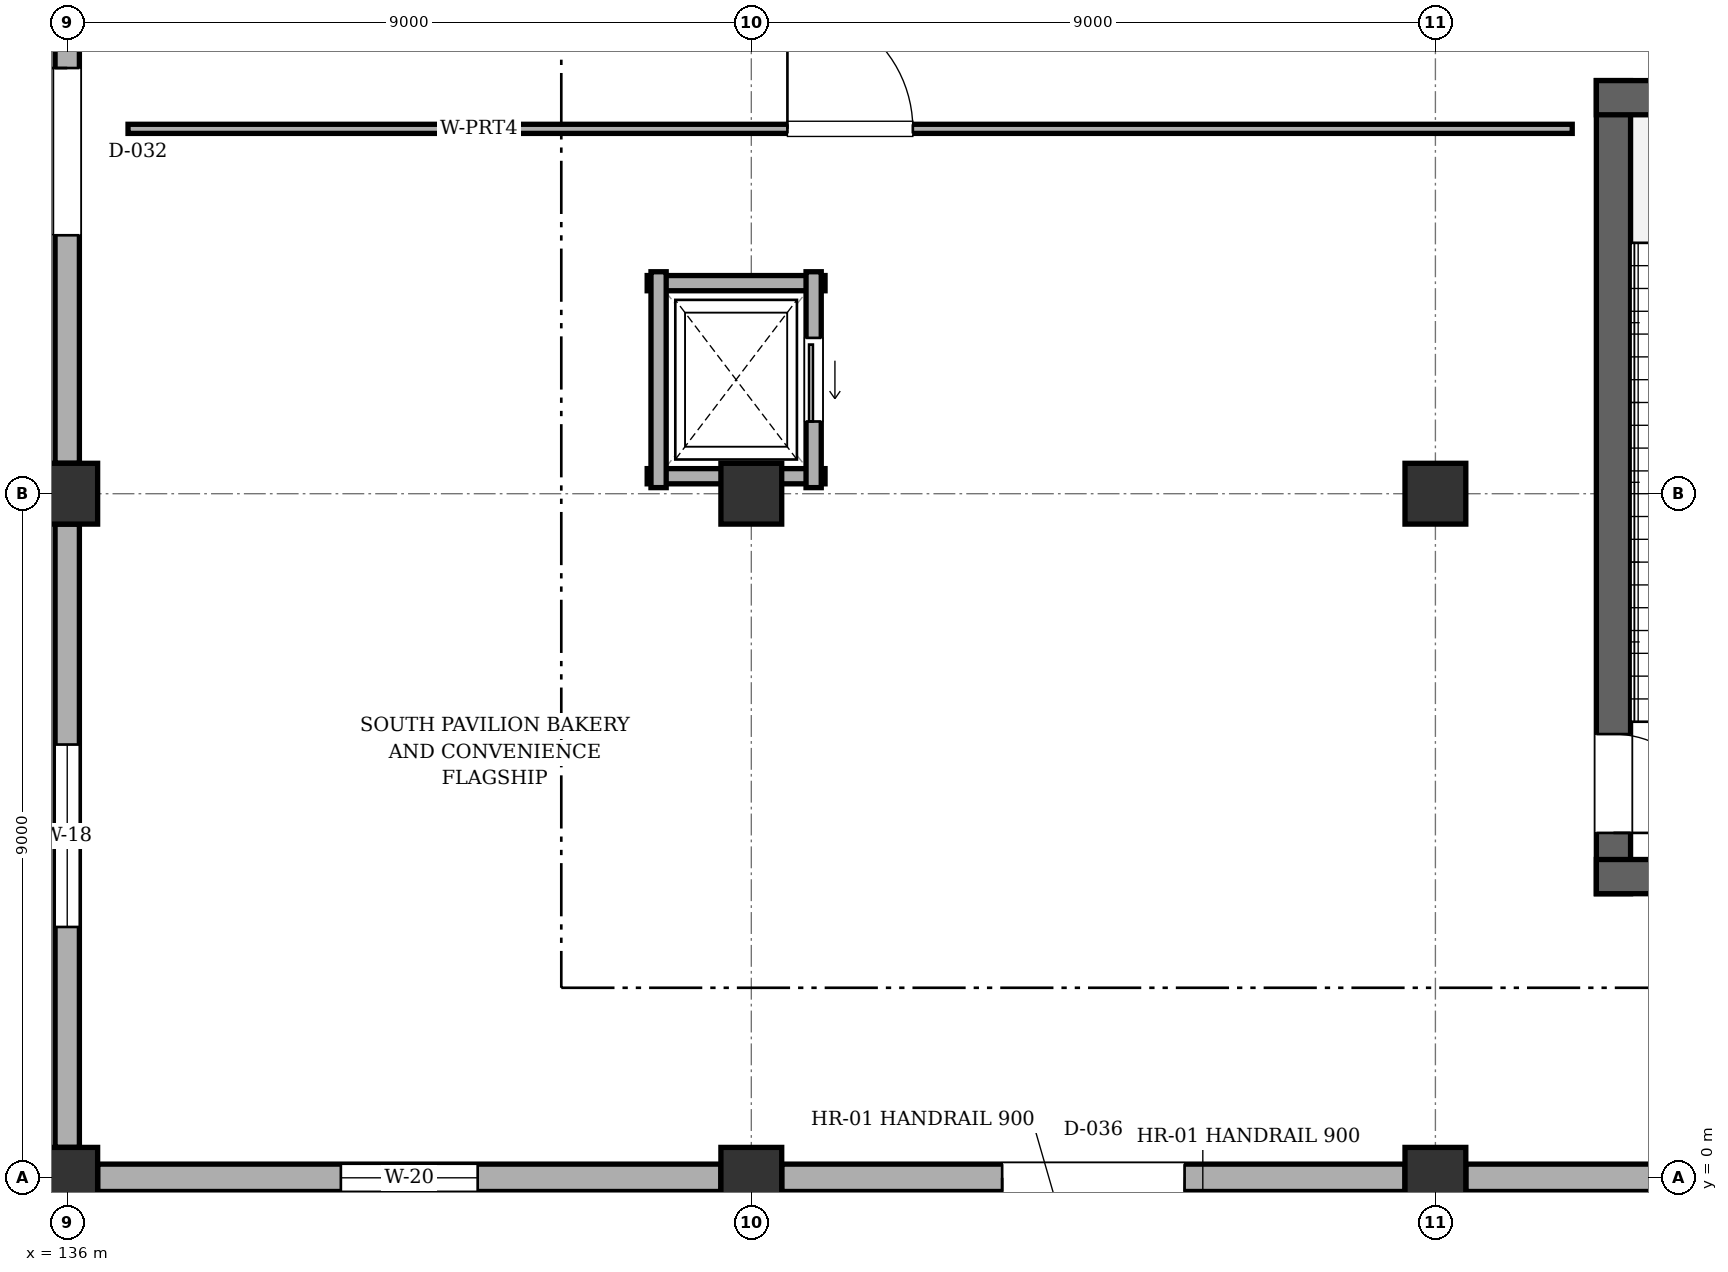
"""IFC4 building model, lengths in metres.
Left out: names, types, materials, properties, quantities, classifications, styles, units other than length and angle.
Written with IfcOpenShell. Run it as: python <this file> out.ifc"""

import sys

from ifc_helpers import new_model, si_unit, direction, frame, frame_2d, origin, origin_2d, place, context, subcontext, project, spatial, rectangle, extrude, element, fill, save


model = new_model("IFC4")
c1 = context("Model", 3, precision=1e-05, world=origin(), true_north=direction((0.0, 1.0)))
c2 = subcontext(c1, "Body", "Model", "MODEL_VIEW")
j1 = project(units=[si_unit("LENGTHUNIT", "METRE"), si_unit("PLANEANGLEUNIT", "RADIAN")], contexts=[c1])
p1 = place(None, origin())
s1 = spatial("IfcSite", under=j1, at=p1, CompositionType="ELEMENT")
p2 = place(p1, origin())
s2 = spatial("IfcBuilding", under=s1, at=p2, CompositionType="ELEMENT")
p3 = place(p2, origin())
s3 = spatial("IfcBuildingStorey", under=s2, at=p3, CompositionType="ELEMENT", Elevation=0.0)
for number, where, z_axis, x_axis in (
    (1, (136.0, 0.0, 0.0), (0.0, 0.0, 1.0), (1.0, 0.0, 0.0)),
    (2, (136.0, 9.0, 0.0), (0.0, 0.0, 1.0), (1.0, 0.0, 0.0)),
    (3, (145.0, 0.0, 0.0), (0.0, 0.0, 1.0), (1.0, 0.0, 0.0)),
    (4, (145.0, 9.0, 0.0), (0.0, 0.0, 1.0), (1.0, 0.0, 0.0)),
    (5, (154.0, 0.0, 0.0), (0.0, 0.0, 1.0), (1.0, 0.0, 0.0)),
    (6, (154.0, 9.0, 0.0), (0.0, 0.0, 1.0), (1.0, 0.0, 0.0)),
):
    element("IfcColumn", number, at=place(p3, frame(where, z_axis=z_axis, x_axis=x_axis)), inside=s3, PredefinedType="COLUMN", context=c2, shape_type="SweptSolid", body=[
        extrude(rectangle(XDim=0.8, YDim=0.8, at=origin_2d()), origin(), (0.0, 0.0, 1.0), 6.6),
    ])
p4 = place(p3, frame((136.0, 0.4, 0.0), z_axis=(0.0, 0.0, 1.0), x_axis=(0.0, 1.0, 0.0)))
e7 = element("IfcWall", 7, at=p4, inside=s3, PredefinedType="SOLIDWALL", context=c2, shape_type="SweptSolid", body=[
    extrude(rectangle(XDim=8.2, YDim=0.32, at=frame_2d((4.1, 0.0))), origin(), (0.0, 0.0, 1.0), 5.875),
])
p5 = place(p4, frame((2.9, 0.0, 0.95)))
e8 = element("IfcOpeningElement", 8, at=p5, cuts=e7, PredefinedType="OPENING", context=c2, shape_type="SweptSolid", body=[
    extrude(rectangle(XDim=2.4, YDim=2.1, at=frame_2d((1.2, 1.05))), frame((0.0, 0.17, 0.0), z_axis=(0.0, -1.0, 0.0), x_axis=(1.0, 0.0, 0.0)), (0.0, 0.0, 1.0), 0.34),
])
p6 = place(p3, frame((136.0, 9.4, 0.0), z_axis=(0.0, 0.0, 1.0), x_axis=(0.0, 1.0, 0.0)))
e9 = element("IfcWall", 9, at=p6, inside=s3, PredefinedType="SOLIDWALL", context=c2, shape_type="SweptSolid", body=[
    extrude(rectangle(XDim=8.2, YDim=0.32, at=frame_2d((4.1, 0.0))), origin(), (0.0, 0.0, 1.0), 5.785),
])
p7 = place(p6, frame((3.0, 0.0, 0.0)))
e10 = element("IfcOpeningElement", 10, at=p7, cuts=e9, PredefinedType="OPENING", context=c2, shape_type="SweptSolid", body=[
    extrude(rectangle(XDim=2.2, YDim=2.45, at=frame_2d((1.1, 1.225))), frame((0.0, 0.17, 0.0), z_axis=(0.0, -1.0, 0.0), x_axis=(1.0, 0.0, 0.0)), (0.0, 0.0, 1.0), 0.34),
])
p8 = place(p3, frame((144.6, 0.0, 0.0), z_axis=(0.0, 0.0, 1.0), x_axis=(-1.0, 0.0, 0.0)))
e11 = element("IfcWall", 11, at=p8, inside=s3, PredefinedType="SOLIDWALL", context=c2, shape_type="SweptSolid", body=[
    extrude(rectangle(XDim=8.2, YDim=0.36, at=frame_2d((4.1, 0.0))), origin(), (0.0, 0.0, 1.0), 5.875),
])
p9 = place(p8, frame((3.2, 0.0, 0.95)))
e12 = element("IfcOpeningElement", 12, at=p9, cuts=e11, PredefinedType="OPENING", context=c2, shape_type="SweptSolid", body=[
    extrude(rectangle(XDim=1.8, YDim=2.0, at=frame_2d((0.9, 1.0))), frame((0.0, 0.19, 0.0), z_axis=(0.0, -1.0, 0.0), x_axis=(1.0, 0.0, 0.0)), (0.0, 0.0, 1.0), 0.38),
])
p10 = place(p3, frame((153.6, 0.0, 0.0), z_axis=(0.0, 0.0, 1.0), x_axis=(-1.0, 0.0, 0.0)))
e13 = element("IfcWall", 13, at=p10, inside=s3, PredefinedType="SOLIDWALL", context=c2, shape_type="SweptSolid", body=[
    extrude(rectangle(XDim=8.2, YDim=0.36, at=frame_2d((4.1, 0.0))), origin(), (0.0, 0.0, 1.0), 5.875),
])
p11 = place(p10, frame((2.9, 0.0, 0.0)))
e14 = element("IfcOpeningElement", 14, at=p11, cuts=e13, PredefinedType="OPENING", context=c2, shape_type="SweptSolid", body=[
    extrude(rectangle(XDim=2.4, YDim=2.5, at=frame_2d((1.2, 1.25))), frame((0.0, 0.19, 0.0), z_axis=(0.0, -1.0, 0.0), x_axis=(1.0, 0.0, 0.0)), (0.0, 0.0, 1.0), 0.38),
])
p12 = place(p3, frame((162.6, 0.0, 0.0), z_axis=(0.0, 0.0, 1.0), x_axis=(-1.0, 0.0, 0.0)))
e15 = element("IfcWall", 15, at=p12, inside=s3, PredefinedType="SOLIDWALL", context=c2, shape_type="SweptSolid", body=[
    extrude(rectangle(XDim=8.2, YDim=0.36, at=frame_2d((4.1, 0.0))), origin(), (0.0, 0.0, 1.0), 5.875),
])
p13 = place(p12, frame((3.3, 0.0, 0.95)))
e16 = element("IfcOpeningElement", 16, at=p13, cuts=e15, PredefinedType="OPENING", context=c2, shape_type="SweptSolid", body=[
    extrude(rectangle(XDim=1.6, YDim=1.9, at=frame_2d((0.8, 0.95))), frame((0.0, 0.19, 0.0), z_axis=(0.0, -1.0, 0.0), x_axis=(1.0, 0.0, 0.0)), (0.0, 0.0, 1.0), 0.38),
])
p14 = place(p3, frame((156.343, 14.435, 0.0), z_axis=(0.0, 0.0, 1.0), x_axis=(0.0, -1.0, 0.0)))
e17 = element("IfcWall", 17, at=p14, inside=s3, PredefinedType="SHEAR", context=c2, shape_type="SweptSolid", body=[
    extrude(rectangle(XDim=10.698, YDim=0.45, at=frame_2d((5.349, 0.0))), origin(), (0.0, 0.0, 1.0), 6.36),
])
p15 = place(p14, frame((8.597, 0.0, 0.0)))
e18 = element("IfcOpeningElement", 18, at=p15, cuts=e17, PredefinedType="OPENING", context=c2, shape_type="SweptSolid", body=[
    extrude(rectangle(XDim=1.3, YDim=2.1, at=frame_2d((0.65, 1.05))), frame((0.0, 0.235, 0.0), z_axis=(0.0, -1.0, 0.0), x_axis=(1.0, 0.0, 0.0)), (0.0, 0.0, 1.0), 0.47),
])
for number, where, z_axis, x_axis in (
    (19, (160.637, 14.21, 0.0), (0.0, 0.0, 1.0), (-1.0, 0.0, 0.0)),
    (20, (156.117, 3.962, 0.0), (0.0, 0.0, 1.0), (1.0, 0.0, 0.0)),
):
    element("IfcWall", number, at=place(p3, frame(where, z_axis=z_axis, x_axis=x_axis)), inside=s3, PredefinedType="SHEAR", context=c2, shape_type="SweptSolid", body=[
        extrude(rectangle(XDim=4.52, YDim=0.45, at=frame_2d((2.26, 0.0))), origin(), (0.0, 0.0, 1.0), 6.36),
    ])
for number, where, z_axis, x_axis in (
    (21, (143.63, 9.23, 0.0), (0.0, 0.0, 1.0), (1.0, 0.0, 0.0)),
    (22, (145.97, 11.77, 0.0), (0.0, 0.0, 1.0), (-1.0, 0.0, 0.0)),
):
    element("IfcWall", number, at=place(p3, frame(where, z_axis=z_axis, x_axis=x_axis)), inside=s3, PredefinedType="SOLIDWALL", context=c2, shape_type="SweptSolid", body=[
        extrude(rectangle(XDim=2.34, YDim=0.2, at=frame_2d((1.17, 0.0))), origin(), (0.0, 0.0, 1.0), 4.4),
    ])
p16 = place(p3, frame((143.78, 11.92, 0.0), z_axis=(0.0, 0.0, 1.0), x_axis=(0.0, -1.0, 0.0)))
e23 = element("IfcWall", 23, at=p16, inside=s3, PredefinedType="SOLIDWALL", context=c2, shape_type="SweptSolid", body=[
    extrude(rectangle(XDim=2.84, YDim=0.2, at=frame_2d((1.42, 0.0))), origin(), (0.0, 0.0, 1.0), 4.4),
])
p17 = place(p3, frame((145.82, 9.08, 0.0), z_axis=(0.0, 0.0, 1.0), x_axis=(0.0, 1.0, 0.0)))
e24 = element("IfcWall", 24, at=p17, inside=s3, PredefinedType="SOLIDWALL", context=c2, shape_type="SweptSolid", body=[
    extrude(rectangle(XDim=2.84, YDim=0.2, at=frame_2d((1.42, 0.0))), origin(), (0.0, 0.0, 1.0), 4.4),
])
p18 = place(p17, frame((0.87, 0.0, 0.0)))
e25 = element("IfcOpeningElement", 25, at=p18, cuts=e24, PredefinedType="OPENING", context=c2, shape_type="SweptSolid", body=[
    extrude(rectangle(XDim=1.1, YDim=2.15, at=frame_2d((0.55, 1.075))), frame((0.0, 0.11, 0.0), z_axis=(0.0, -1.0, 0.0), x_axis=(1.0, 0.0, 0.0)), (0.0, 0.0, 1.0), 0.22),
])
p19 = place(p3, frame((136.8, 13.8, 0.0), z_axis=(0.0, 0.0, 1.0), x_axis=(1.0, 0.0, 0.0)))
e26 = element("IfcWall", 26, at=p19, inside=s3, PredefinedType="PARTITIONING", context=c2, shape_type="SweptSolid", body=[
    extrude(rectangle(XDim=19.0, YDim=0.12, at=frame_2d((9.5, 0.0))), origin(), (0.0, 0.0, 1.0), 4.4),
])
p20 = place(p19, frame((8.675, 0.0, 0.0)))
e27 = element("IfcOpeningElement", 27, at=p20, cuts=e26, PredefinedType="OPENING", context=c2, shape_type="SweptSolid", body=[
    extrude(rectangle(XDim=1.65, YDim=2.1, at=frame_2d((0.825, 1.05))), frame((0.0, 0.07, 0.0), z_axis=(0.0, -1.0, 0.0), x_axis=(1.0, 0.0, 0.0)), (0.0, 0.0, 1.0), 0.14),
])
p21 = place(p5, origin())
e28 = element("IfcWindow", 28, at=p21, inside=s3, PartitioningType="SINGLE_PANEL", PredefinedType="WINDOW", context=c2, shape_type="SweptSolid", body=[
    extrude(rectangle(XDim=2.4, YDim=2.1, at=frame_2d((1.2, 1.05))), frame((0.0, 0.03, 0.0), z_axis=(0.0, -1.0, 0.0), x_axis=(1.0, 0.0, 0.0)), (0.0, 0.0, 1.0), 0.06),
])
fill(e8, e28)
p22 = place(p7, origin())
e29 = element("IfcDoor", 29, at=p22, inside=s3, OperationType="SINGLE_SWING_RIGHT", PredefinedType="DOOR", context=c2, shape_type="SweptSolid", body=[
    extrude(rectangle(XDim=2.2, YDim=2.45, at=frame_2d((1.1, 1.225))), frame((0.0, 0.025, 0.0), z_axis=(0.0, -1.0, 0.0), x_axis=(1.0, 0.0, 0.0)), (0.0, 0.0, 1.0), 0.05),
])
fill(e10, e29)
p23 = place(p9, origin())
e30 = element("IfcWindow", 30, at=p23, inside=s3, PartitioningType="SINGLE_PANEL", PredefinedType="WINDOW", context=c2, shape_type="SweptSolid", body=[
    extrude(rectangle(XDim=1.8, YDim=2.0, at=frame_2d((0.9, 1.0))), frame((0.0, 0.03, 0.0), z_axis=(0.0, -1.0, 0.0), x_axis=(1.0, 0.0, 0.0)), (0.0, 0.0, 1.0), 0.06),
])
fill(e12, e30)
p24 = place(p11, origin())
e31 = element("IfcDoor", 31, at=p24, inside=s3, OperationType="SINGLE_SWING_RIGHT", PredefinedType="DOOR", context=c2, shape_type="SweptSolid", body=[
    extrude(rectangle(XDim=2.4, YDim=2.5, at=frame_2d((1.2, 1.25))), frame((0.0, 0.025, 0.0), z_axis=(0.0, -1.0, 0.0), x_axis=(1.0, 0.0, 0.0)), (0.0, 0.0, 1.0), 0.05),
])
fill(e14, e31)
p25 = place(p15, origin())
e32 = element("IfcDoor", 32, at=p25, inside=s3, OperationType="SINGLE_SWING_RIGHT", PredefinedType="DOOR", context=c2, shape_type="SweptSolid", body=[
    extrude(rectangle(XDim=1.3, YDim=2.1, at=frame_2d((0.65, 1.05))), frame((0.0, 0.025, 0.0), z_axis=(0.0, -1.0, 0.0), x_axis=(1.0, 0.0, 0.0)), (0.0, 0.0, 1.0), 0.05),
])
fill(e18, e32)
p26 = place(p18, origin())
e33 = element("IfcDoor", 33, at=p26, inside=s3, OperationType="SLIDING_TO_LEFT", PredefinedType="DOOR", context=c2, shape_type="SweptSolid", body=[
    extrude(rectangle(XDim=1.1, YDim=2.15, at=frame_2d((0.55, 1.075))), frame((0.0, 0.025, 0.0), z_axis=(0.0, -1.0, 0.0), x_axis=(1.0, 0.0, 0.0)), (0.0, 0.0, 1.0), 0.05),
])
fill(e25, e33)
p27 = place(p20, origin())
e34 = element("IfcDoor", 34, at=p27, inside=s3, OperationType="SINGLE_SWING_LEFT", PredefinedType="DOOR", context=c2, shape_type="SweptSolid", body=[
    extrude(rectangle(XDim=1.65, YDim=2.1, at=frame_2d((0.825, 1.05))), frame((0.0, 0.025, 0.0), z_axis=(0.0, -1.0, 0.0), x_axis=(1.0, 0.0, 0.0)), (0.0, 0.0, 1.0), 0.05),
])
fill(e27, e34)
save(model, sys.argv[1])
